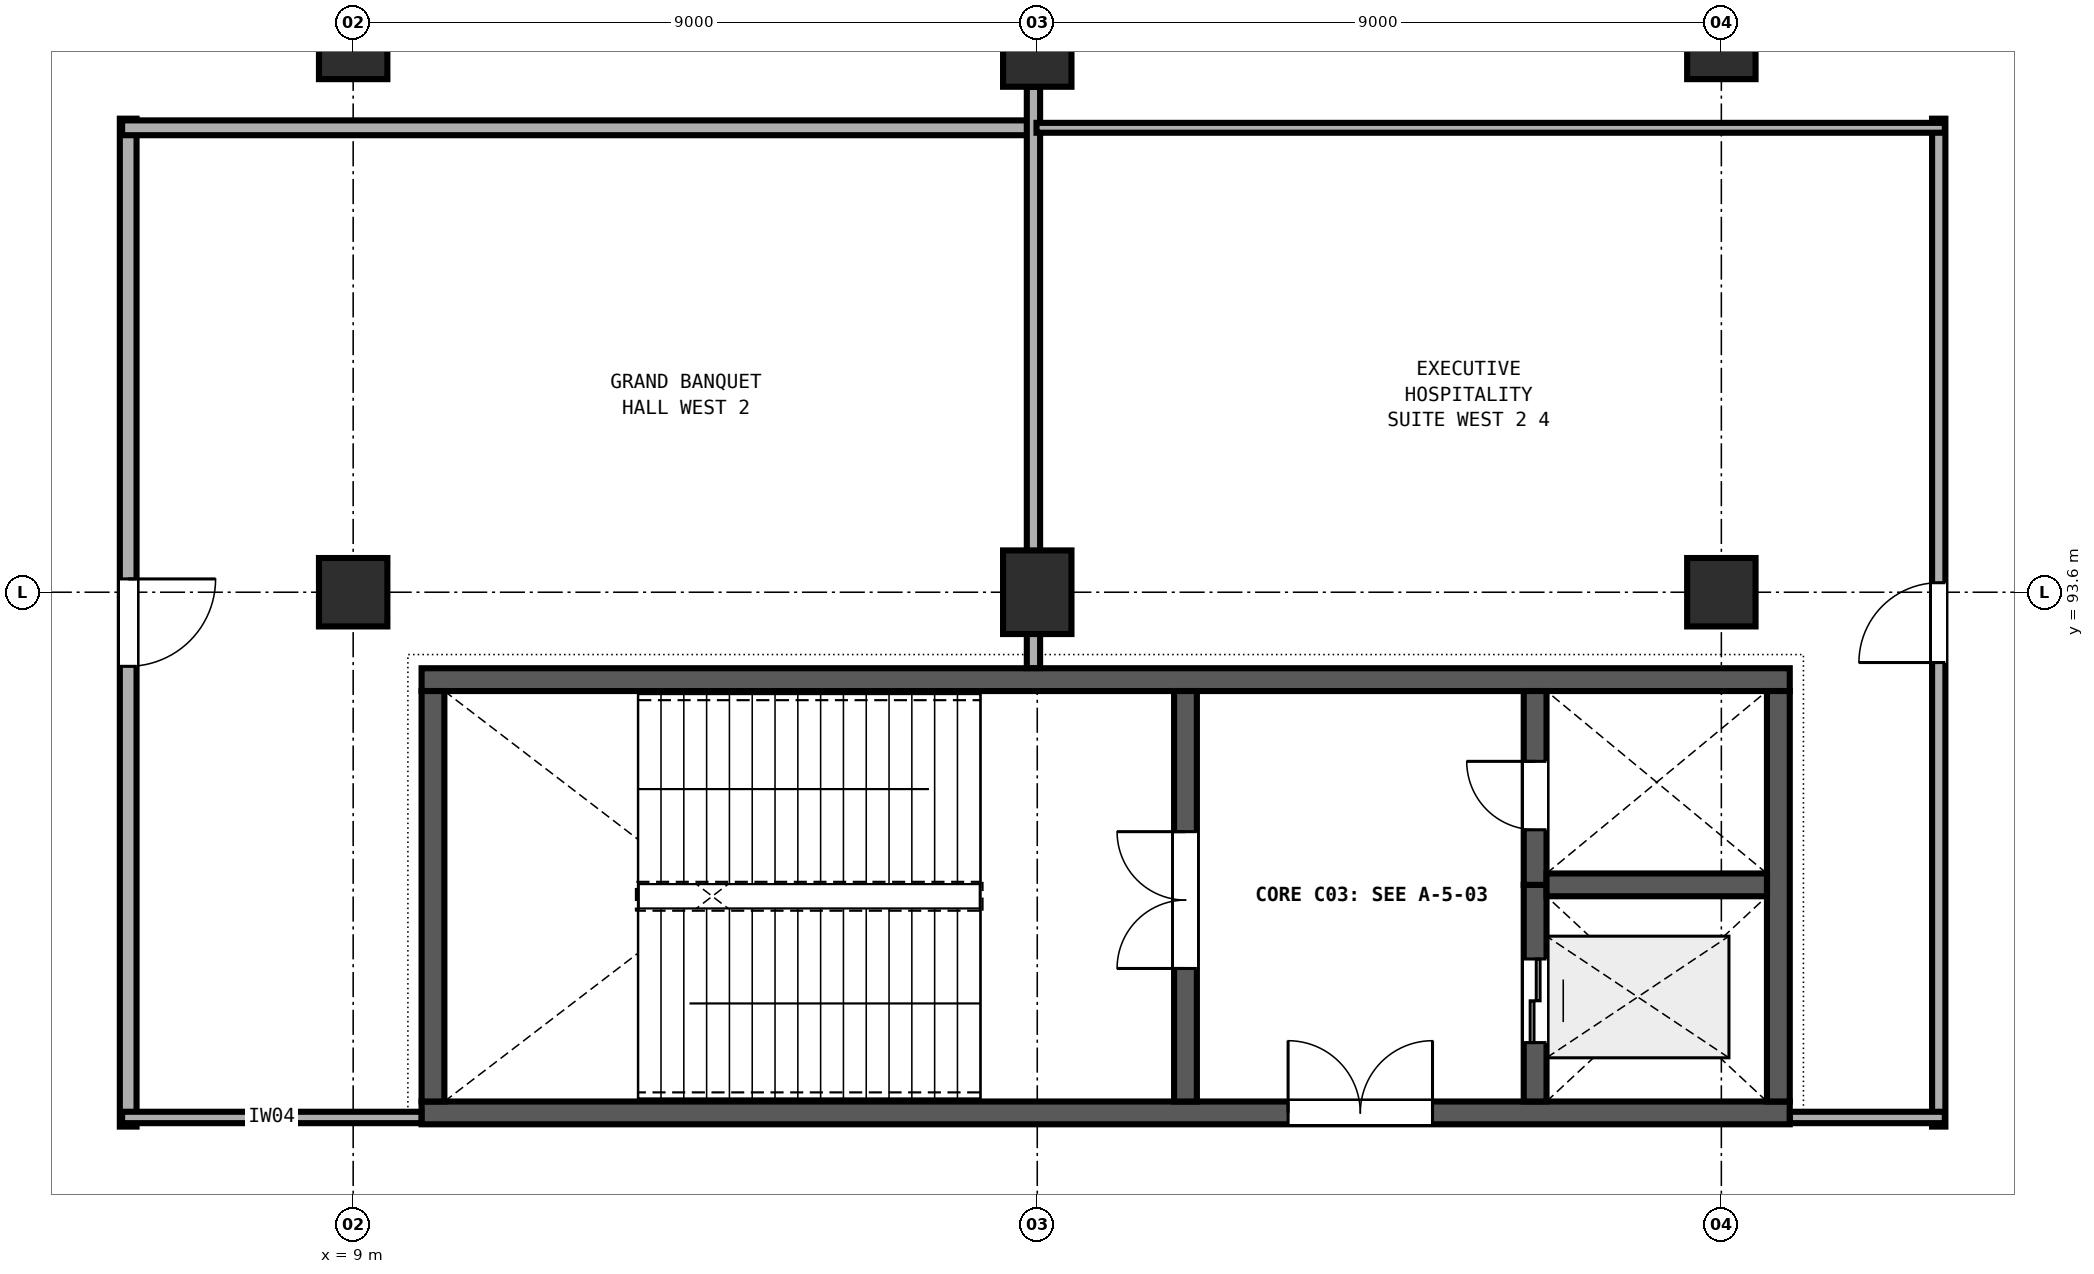
"""IFC4 building model, lengths in metres.
Left out: names, types, materials, properties, quantities, classifications, styles, units other than length and angle.
Written with IfcOpenShell. Run it as: python <this file> out.ifc"""

import sys

from ifc_helpers import new_model, si_unit, direction, frame, frame_2d, origin, origin_2d, place, context, subcontext, project, spatial, rectangle, extrude, element, fill, save


model = new_model("IFC4")
c1 = context("Model", 3, precision=1e-05, world=origin(), true_north=direction((0.0, 1.0)))
c2 = subcontext(c1, "Body", "Model", "MODEL_VIEW")
j1 = project(units=[si_unit("LENGTHUNIT", "METRE"), si_unit("PLANEANGLEUNIT", "RADIAN")], contexts=[c1])
p1 = place(None, origin())
s1 = spatial("IfcSite", under=j1, at=p1, CompositionType="ELEMENT")
p2 = place(p1, origin())
s2 = spatial("IfcBuilding", under=s1, at=p2, CompositionType="ELEMENT")
p3 = place(p2, frame((0.0, 0.0, 14.4)))
s3 = spatial("IfcBuildingStorey", under=s2, at=p3, CompositionType="ELEMENT", Elevation=14.4)
for number, where, z_axis, x_axis in (
    (1, (9.0, 93.6, 0.0), (0.0, 0.0, 1.0), (1.0, 0.0, 0.0)),
    (2, (9.0, 100.8, 0.0), (0.0, 0.0, 1.0), (1.0, 0.0, 0.0)),
):
    element("IfcColumn", number, at=place(p3, frame(where, z_axis=z_axis, x_axis=x_axis)), inside=s3, PredefinedType="COLUMN", context=c2, shape_type="SweptSolid", body=[
        extrude(rectangle(XDim=0.9, YDim=0.9, at=origin_2d()), origin(), (0.0, 0.0, 1.0), 4.8),
    ])
for number, where, z_axis, x_axis in (
    (3, (18.0, 93.6, 0.0), (0.0, 0.0, 1.0), (1.0, 0.0, 0.0)),
    (4, (18.0, 100.8, 0.0), (0.0, 0.0, 1.0), (1.0, 0.0, 0.0)),
):
    element("IfcColumn", number, at=place(p3, frame(where, z_axis=z_axis, x_axis=x_axis)), inside=s3, PredefinedType="COLUMN", context=c2, shape_type="SweptSolid", body=[
        extrude(rectangle(XDim=0.9, YDim=1.1, at=origin_2d()), origin(), (0.0, 0.0, 1.0), 4.8),
    ])
for number, where, z_axis, x_axis in (
    (5, (27.0, 93.6, 0.0), (0.0, 0.0, 1.0), (1.0, 0.0, 0.0)),
    (6, (27.0, 100.8, 0.0), (0.0, 0.0, 1.0), (1.0, 0.0, 0.0)),
):
    element("IfcColumn", number, at=place(p3, frame(where, z_axis=z_axis, x_axis=x_axis)), inside=s3, PredefinedType="COLUMN", context=c2, shape_type="SweptSolid", body=[
        extrude(rectangle(XDim=0.9, YDim=0.9, at=origin_2d()), origin(), (0.0, 0.0, 1.0), 4.8),
    ])
p4 = place(p3, frame((9.9, 86.75, 0.0), z_axis=(0.0, 0.0, 1.0), x_axis=(1.0, 0.0, 0.0)))
e7 = element("IfcWall", 7, at=p4, inside=s3, PredefinedType="SHEAR", context=c2, shape_type="SweptSolid", body=[
    extrude(rectangle(XDim=18.0, YDim=0.3, at=frame_2d((9.0, 0.0))), origin(), (0.0, 0.0, 1.0), 4.48),
])
p5 = place(p4, frame((11.4, 0.0, 0.0)))
e8 = element("IfcOpeningElement", 8, at=p5, cuts=e7, PredefinedType="OPENING", context=c2, shape_type="SweptSolid", body=[
    extrude(rectangle(XDim=1.9, YDim=2.25, at=frame_2d((0.95, 1.125))), frame((0.0, 0.16, 0.0), z_axis=(0.0, -1.0, 0.0), x_axis=(1.0, 0.0, 0.0)), (0.0, 0.0, 1.0), 0.32),
])
p6 = place(p3, frame((27.9, 92.45, 0.0), z_axis=(0.0, 0.0, 1.0), x_axis=(-1.0, 0.0, 0.0)))
e9 = element("IfcWall", 9, at=p6, inside=s3, PredefinedType="SHEAR", context=c2, shape_type="SweptSolid", body=[
    extrude(rectangle(XDim=18.0, YDim=0.3, at=frame_2d((9.0, 0.0))), origin(), (0.0, 0.0, 1.0), 4.48),
])
for number, where, z_axis, x_axis in (
    (10, (10.05, 92.3, 0.0), (0.0, 0.0, 1.0), (0.0, -1.0, 0.0)),
    (11, (27.75, 86.9, 0.0), (0.0, 0.0, 1.0), (0.0, 1.0, 0.0)),
):
    element("IfcWall", number, at=place(p3, frame(where, z_axis=z_axis, x_axis=x_axis)), inside=s3, PredefinedType="SHEAR", context=c2, shape_type="SweptSolid", body=[
        extrude(rectangle(XDim=5.4, YDim=0.3, at=frame_2d((2.7, 0.0))), origin(), (0.0, 0.0, 1.0), 4.48),
    ])
p7 = place(p3, frame((19.95, 86.9, 0.0), z_axis=(0.0, 0.0, 1.0), x_axis=(0.0, 1.0, 0.0)))
e12 = element("IfcWall", 12, at=p7, inside=s3, PredefinedType="SHEAR", context=c2, shape_type="SweptSolid", body=[
    extrude(rectangle(XDim=5.4, YDim=0.3, at=frame_2d((2.7, 0.0))), origin(), (0.0, 0.0, 1.0), 4.48),
])
p8 = place(p7, frame((1.75, 0.0, 0.0)))
e13 = element("IfcOpeningElement", 13, at=p8, cuts=e12, PredefinedType="OPENING", context=c2, shape_type="SweptSolid", body=[
    extrude(rectangle(XDim=1.8, YDim=2.25, at=frame_2d((0.9, 1.125))), frame((0.0, 0.16, 0.0), z_axis=(0.0, -1.0, 0.0), x_axis=(1.0, 0.0, 0.0)), (0.0, 0.0, 1.0), 0.32),
])
p9 = place(p3, frame((24.55, 86.9, 0.0), z_axis=(0.0, 0.0, 1.0), x_axis=(0.0, 1.0, 0.0)))
e14 = element("IfcWall", 14, at=p9, inside=s3, PredefinedType="SHEAR", context=c2, shape_type="SweptSolid", body=[
    extrude(rectangle(XDim=2.85, YDim=0.3, at=frame_2d((1.425, 0.0))), origin(), (0.0, 0.0, 1.0), 4.48),
])
p10 = place(p9, frame((0.775, 0.0, 0.0)))
e15 = element("IfcOpeningElement", 15, at=p10, cuts=e14, PredefinedType="OPENING", context=c2, shape_type="SweptSolid", body=[
    extrude(rectangle(XDim=1.1, YDim=2.1, at=frame_2d((0.55, 1.05))), frame((0.0, 0.16, 0.0), z_axis=(0.0, -1.0, 0.0), x_axis=(1.0, 0.0, 0.0)), (0.0, 0.0, 1.0), 0.32),
])
p11 = place(p3, frame((24.55, 89.75, 0.0), z_axis=(0.0, 0.0, 1.0), x_axis=(0.0, 1.0, 0.0)))
e16 = element("IfcWall", 16, at=p11, inside=s3, PredefinedType="SHEAR", context=c2, shape_type="SweptSolid", body=[
    extrude(rectangle(XDim=2.55, YDim=0.3, at=frame_2d((1.275, 0.0))), origin(), (0.0, 0.0, 1.0), 4.48),
])
p12 = place(p11, frame((0.725, 0.0, 0.0)))
e17 = element("IfcOpeningElement", 17, at=p12, cuts=e16, PredefinedType="OPENING", context=c2, shape_type="SweptSolid", body=[
    extrude(rectangle(XDim=0.9, YDim=2.1, at=frame_2d((0.45, 1.05))), frame((0.0, 0.16, 0.0), z_axis=(0.0, -1.0, 0.0), x_axis=(1.0, 0.0, 0.0)), (0.0, 0.0, 1.0), 0.32),
])
p13 = place(p3, frame((24.7, 89.75, 0.0), z_axis=(0.0, 0.0, 1.0), x_axis=(1.0, 0.0, 0.0)))
e18 = element("IfcWall", 18, at=p13, inside=s3, PredefinedType="SHEAR", context=c2, shape_type="SweptSolid", body=[
    extrude(rectangle(XDim=2.9, YDim=0.3, at=frame_2d((1.45, 0.0))), origin(), (0.0, 0.0, 1.0), 4.48),
])
p14 = place(p3, frame((6.04, 99.83, 0.0), z_axis=(0.0, 0.0, 1.0), x_axis=(0.0, -1.0, 0.0)))
e19 = element("IfcWall", 19, at=p14, inside=s3, PredefinedType="PARTITIONING", context=c2, shape_type="SweptSolid", body=[
    extrude(rectangle(XDim=13.26, YDim=0.22, at=frame_2d((6.63, 0.0))), origin(), (0.0, 0.0, 1.0), 3.56),
])
p15 = place(p14, frame((6.055, 0.0, 0.0)))
e20 = element("IfcOpeningElement", 20, at=p15, cuts=e19, PredefinedType="OPENING", context=c2, shape_type="SweptSolid", body=[
    extrude(rectangle(XDim=1.15, YDim=2.15, at=frame_2d((0.575, 1.075))), frame((0.0, 0.12, 0.0), z_axis=(0.0, -1.0, 0.0), x_axis=(1.0, 0.0, 0.0)), (0.0, 0.0, 1.0), 0.24),
])
p16 = place(p3, frame((5.96, 99.71, 0.0), z_axis=(0.0, 0.0, 1.0), x_axis=(1.0, 0.0, 0.0)))
e21 = element("IfcWall", 21, at=p16, inside=s3, PredefinedType="PARTITIONING", context=c2, shape_type="SweptSolid", body=[
    extrude(rectangle(XDim=11.95, YDim=0.195, at=frame_2d((5.975, 0.0))), origin(), (0.0, 0.0, 1.0), 3.56),
])
p17 = place(p3, frame((17.95, 100.248, 0.0), z_axis=(0.0, 0.0, 1.0), x_axis=(0.0, -1.0, 0.0)))
e22 = element("IfcWall", 22, at=p17, inside=s3, PredefinedType="PARTITIONING", context=c2, shape_type="SweptSolid", body=[
    extrude(rectangle(XDim=7.646, YDim=0.175, at=frame_2d((3.823, 0.0))), origin(), (0.0, 0.0, 1.0), 3.56),
])
p18 = place(p3, frame((9.898, 86.69, 0.0), z_axis=(0.0, 0.0, 1.0), x_axis=(-1.0, 0.0, 0.0)))
e23 = element("IfcWall", 23, at=p18, inside=s3, PredefinedType="PARTITIONING", context=c2, shape_type="SweptSolid", body=[
    extrude(rectangle(XDim=3.938, YDim=0.15, at=frame_2d((1.969, 0.0))), origin(), (0.0, 0.0, 1.0), 3.56),
])
p19 = place(p3, frame((29.86, 86.57, 0.0), z_axis=(0.0, 0.0, 1.0), x_axis=(0.0, 1.0, 0.0)))
e24 = element("IfcWall", 24, at=p19, inside=s3, PredefinedType="PARTITIONING", context=c2, shape_type="SweptSolid", body=[
    extrude(rectangle(XDim=13.26, YDim=0.175, at=frame_2d((6.63, 0.0))), origin(), (0.0, 0.0, 1.0), 3.56),
])
p20 = place(p19, frame((6.105, 0.0, 0.0)))
e25 = element("IfcOpeningElement", 25, at=p20, cuts=e24, PredefinedType="OPENING", context=c2, shape_type="SweptSolid", body=[
    extrude(rectangle(XDim=1.05, YDim=2.1, at=frame_2d((0.525, 1.05))), frame((0.0, 0.097, 0.0), z_axis=(0.0, -1.0, 0.0), x_axis=(1.0, 0.0, 0.0)), (0.0, 0.0, 1.0), 0.195),
])
p21 = place(p3, frame((29.94, 86.69, 0.0), z_axis=(0.0, 0.0, 1.0), x_axis=(-1.0, 0.0, 0.0)))
e26 = element("IfcWall", 26, at=p21, inside=s3, PredefinedType="PARTITIONING", context=c2, shape_type="SweptSolid", body=[
    extrude(rectangle(XDim=2.038, YDim=0.15, at=frame_2d((1.019, 0.0))), origin(), (0.0, 0.0, 1.0), 3.56),
])
p22 = place(p3, frame((17.99, 99.71, 0.0), z_axis=(0.0, 0.0, 1.0), x_axis=(1.0, 0.0, 0.0)))
e27 = element("IfcWall", 27, at=p22, inside=s3, PredefinedType="PARTITIONING", context=c2, shape_type="SweptSolid", body=[
    extrude(rectangle(XDim=11.95, YDim=0.13, at=frame_2d((5.975, 0.0))), origin(), (0.0, 0.0, 1.0), 3.56),
])
p23 = place(p8, origin())
e28 = element("IfcDoor", 28, at=p23, inside=s3, OperationType="DOUBLE_DOOR_SINGLE_SWING", PredefinedType="DOOR", context=c2, shape_type="SweptSolid", body=[
    extrude(rectangle(XDim=1.8, YDim=2.25, at=frame_2d((0.9, 1.125))), frame((0.0, 0.025, 0.0), z_axis=(0.0, -1.0, 0.0), x_axis=(1.0, 0.0, 0.0)), (0.0, 0.0, 1.0), 0.05),
])
fill(e13, e28)
p24 = place(p12, origin())
e29 = element("IfcDoor", 29, at=p24, inside=s3, OperationType="SINGLE_SWING_RIGHT", PredefinedType="DOOR", context=c2, shape_type="SweptSolid", body=[
    extrude(rectangle(XDim=0.9, YDim=2.1, at=frame_2d((0.45, 1.05))), frame((0.0, 0.025, 0.0), z_axis=(0.0, -1.0, 0.0), x_axis=(1.0, 0.0, 0.0)), (0.0, 0.0, 1.0), 0.05),
])
fill(e17, e29)
p25 = place(p10, origin())
e30 = element("IfcDoor", 30, at=p25, inside=s3, OperationType="DOUBLE_DOOR_SLIDING", PredefinedType="DOOR", context=c2, shape_type="SweptSolid", body=[
    extrude(rectangle(XDim=1.1, YDim=2.1, at=frame_2d((0.55, 1.05))), frame((0.0, 0.025, 0.0), z_axis=(0.0, -1.0, 0.0), x_axis=(1.0, 0.0, 0.0)), (0.0, 0.0, 1.0), 0.05),
])
fill(e15, e30)
p26 = place(p5, origin())
e31 = element("IfcDoor", 31, at=p26, inside=s3, OperationType="DOUBLE_DOOR_SINGLE_SWING", PredefinedType="DOOR", context=c2, shape_type="SweptSolid", body=[
    extrude(rectangle(XDim=1.9, YDim=2.25, at=frame_2d((0.95, 1.125))), frame((0.0, 0.025, 0.0), z_axis=(0.0, -1.0, 0.0), x_axis=(1.0, 0.0, 0.0)), (0.0, 0.0, 1.0), 0.05),
])
fill(e8, e31)
p27 = place(p15, origin())
e32 = element("IfcDoor", 32, at=p27, inside=s3, OperationType="SINGLE_SWING_LEFT", PredefinedType="DOOR", context=c2, shape_type="SweptSolid", body=[
    extrude(rectangle(XDim=1.15, YDim=2.15, at=frame_2d((0.575, 1.075))), frame((0.0, 0.025, 0.0), z_axis=(0.0, -1.0, 0.0), x_axis=(1.0, 0.0, 0.0)), (0.0, 0.0, 1.0), 0.05),
])
fill(e20, e32)
p28 = place(p20, origin())
e33 = element("IfcDoor", 33, at=p28, inside=s3, OperationType="SINGLE_SWING_LEFT", PredefinedType="DOOR", context=c2, shape_type="SweptSolid", body=[
    extrude(rectangle(XDim=1.05, YDim=2.1, at=frame_2d((0.525, 1.05))), frame((0.0, 0.025, 0.0), z_axis=(0.0, -1.0, 0.0), x_axis=(1.0, 0.0, 0.0)), (0.0, 0.0, 1.0), 0.05),
])
fill(e25, e33)
save(model, sys.argv[1])
